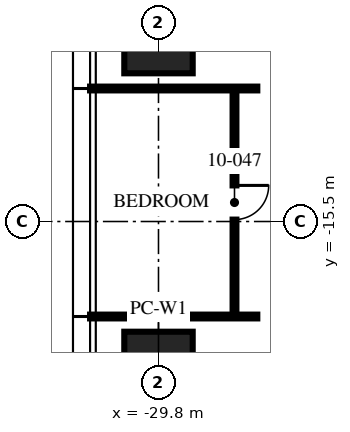
"""IFC4 building model, lengths in metres.
Left out: names, types, materials, properties, quantities, classifications, styles, units other than length and angle.
Written with IfcOpenShell. Run it as: python <this file> out.ifc"""

import sys

from ifc_helpers import new_model, si_unit, direction, frame, frame_2d, origin, origin_2d, place, context, subcontext, project, spatial, rectangle, hollow_rectangle, extrude, element, fill, save


model = new_model("IFC4")
c1 = context("Model", 3, precision=1e-05, world=origin(), true_north=direction((0.0, 1.0)))
c2 = subcontext(c1, "Body", "Model", "MODEL_VIEW")
j1 = project(units=[si_unit("LENGTHUNIT", "METRE"), si_unit("PLANEANGLEUNIT", "RADIAN")], contexts=[c1])
p1 = place(None, origin())
s1 = spatial("IfcSite", under=j1, at=p1, CompositionType="ELEMENT")
p2 = place(p1, origin())
s2 = spatial("IfcBuilding", under=s1, at=p2, CompositionType="ELEMENT")
p3 = place(p2, frame((0.0, 0.0, 43.5)))
s3 = spatial("IfcBuildingStorey", under=s2, at=p3, CompositionType="ELEMENT", Elevation=43.5)
for number, where, z_axis, x_axis in (
    (1, (-29.8, -20.0, 0.0), (0.0, 0.0, 1.0), (0.0, 1.0, 0.0)),
    (2, (-29.8, -10.0, 0.0), (0.0, 0.0, 1.0), (0.0, 1.0, 0.0)),
):
    element("IfcColumn", number, at=place(p3, frame(where, z_axis=z_axis, x_axis=x_axis)), inside=s3, PredefinedType="COLUMN", context=c2, shape_type="SweptSolid", body=[
        extrude(hollow_rectangle(XDim=3.2, YDim=1.8, WallThickness=0.2, at=origin_2d()), origin(), (0.0, 0.0, 1.0), 3.75),
    ])
for number, where, z_axis, x_axis in (
    (3, (-27.2, -12.0, 0.0), (0.0, 0.0, 1.0), (-1.0, 0.0, 0.0)),
    (4, (-27.2, -18.0, 0.0), (0.0, 0.0, 1.0), (-1.0, 0.0, 0.0)),
):
    element("IfcWall", number, at=place(p3, frame(where, z_axis=z_axis, x_axis=x_axis)), inside=s3, PredefinedType="PARTITIONING", context=c2, shape_type="SweptSolid", body=[
        extrude(rectangle(XDim=4.4, YDim=0.1, at=frame_2d((2.2, 0.0))), origin(), (0.0, 0.0, 1.0), 2.71),
    ])
p4 = place(p3, frame((-27.8, -12.0, 0.0), z_axis=(0.0, 0.0, 1.0), x_axis=(0.0, -1.0, 0.0)))
e5 = element("IfcWall", 5, at=p4, inside=s3, PredefinedType="PARTITIONING", context=c2, shape_type="SweptSolid", body=[
    extrude(rectangle(XDim=6.0, YDim=0.1, at=frame_2d((3.0, 0.0))), origin(), (0.0, 0.0, 1.0), 2.61),
])
p5 = place(p4, frame((2.55, 0.0, 0.0)))
e6 = element("IfcOpeningElement", 6, at=p5, cuts=e5, PredefinedType="OPENING", context=c2, shape_type="SweptSolid", body=[
    extrude(rectangle(XDim=0.9, YDim=2.1, at=frame_2d((0.45, 1.05))), frame((0.0, 0.06, 0.0), z_axis=(0.0, -1.0, 0.0), x_axis=(1.0, 0.0, 0.0)), (0.0, 0.0, 1.0), 0.12),
])
p6 = place(p5, origin())
e7 = element("IfcDoor", 7, at=p6, inside=s3, OperationType="SINGLE_SWING_LEFT", PredefinedType="DOOR", context=c2, shape_type="SweptSolid", body=[
    extrude(rectangle(XDim=0.9, YDim=2.1, at=frame_2d((0.45, 1.05))), frame((0.0, 0.025, 0.0), z_axis=(0.0, -1.0, 0.0), x_axis=(1.0, 0.0, 0.0)), (0.0, 0.0, 1.0), 0.05),
])
fill(e6, e7)
save(model, sys.argv[1])
